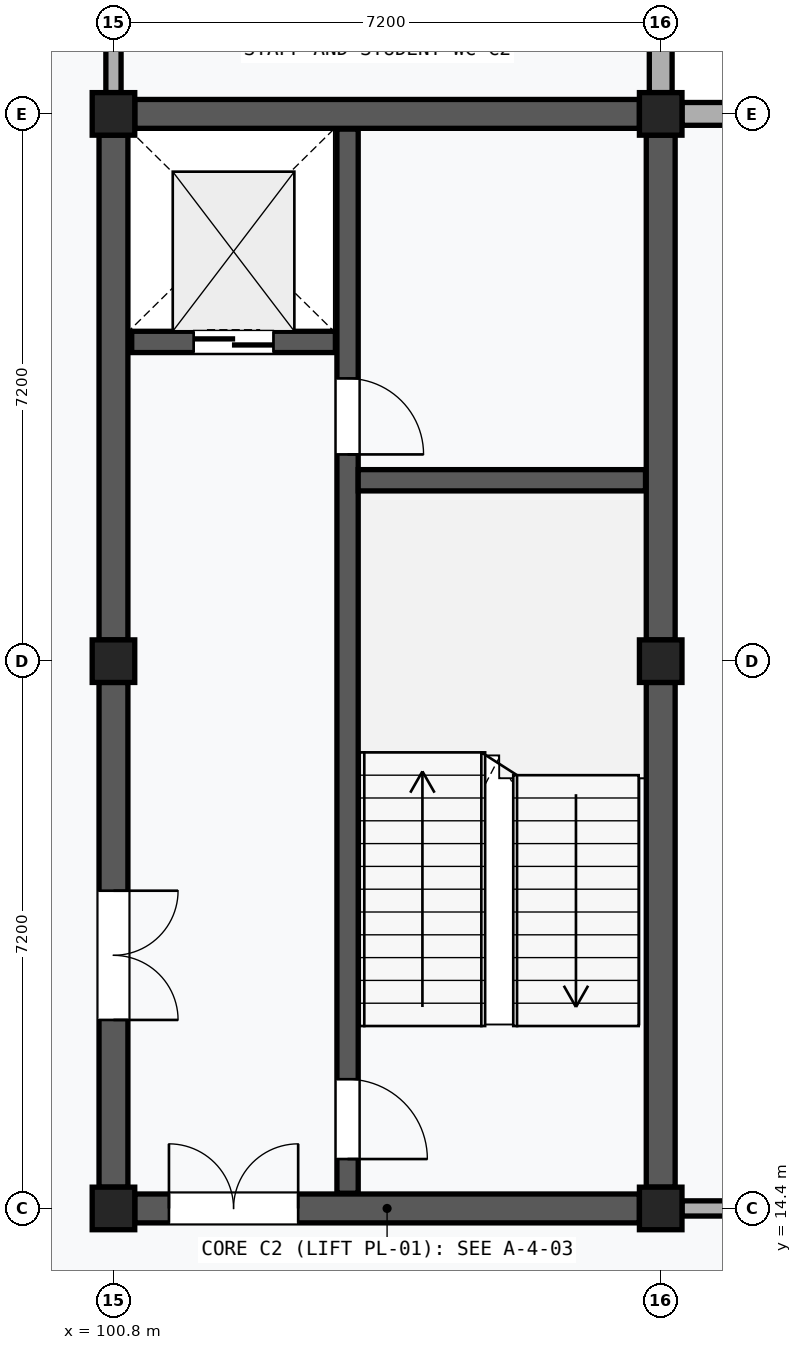
"""IFC4 building model, lengths in metres.
Left out: names, types, materials, properties, quantities, classifications, styles, units other than length and angle.
Written with IfcOpenShell. Run it as: python <this file> out.ifc"""

import sys

from ifc_helpers import new_model, si_unit, direction, frame, frame_2d, origin, origin_2d, place, context, subcontext, project, spatial, rectangle, extrude, element, fill, save


model = new_model("IFC4")
c1 = context("Model", 3, precision=1e-05, world=origin(), true_north=direction((0.0, 1.0)))
c2 = subcontext(c1, "Body", "Model", "MODEL_VIEW")
j1 = project(units=[si_unit("LENGTHUNIT", "METRE"), si_unit("PLANEANGLEUNIT", "RADIAN")], contexts=[c1])
p1 = place(None, origin())
s1 = spatial("IfcSite", under=j1, at=p1, CompositionType="ELEMENT")
p2 = place(p1, origin())
s2 = spatial("IfcBuilding", under=s1, at=p2, CompositionType="ELEMENT")
p3 = place(p2, frame((0.0, 0.0, 34.8)))
s3 = spatial("IfcBuildingStorey", under=s2, at=p3, CompositionType="ELEMENT", Elevation=34.8)
for number, where, z_axis, x_axis in (
    (1, (100.8, 14.4, 0.0), (0.0, 0.0, 1.0), (1.0, 0.0, 0.0)),
    (2, (100.8, 21.6, 0.0), (0.0, 0.0, 1.0), (1.0, 0.0, 0.0)),
    (3, (100.8, 28.8, 0.0), (0.0, 0.0, 1.0), (1.0, 0.0, 0.0)),
    (4, (108.0, 14.4, 0.0), (0.0, 0.0, 1.0), (1.0, 0.0, 0.0)),
    (5, (108.0, 21.6, 0.0), (0.0, 0.0, 1.0), (1.0, 0.0, 0.0)),
    (6, (108.0, 28.8, 0.0), (0.0, 0.0, 1.0), (1.0, 0.0, 0.0)),
):
    element("IfcColumn", number, at=place(p3, frame(where, z_axis=z_axis, x_axis=x_axis)), inside=s3, PredefinedType="COLUMN", context=c2, shape_type="SweptSolid", body=[
        extrude(rectangle(XDim=0.56, YDim=0.56, at=origin_2d()), origin(), (0.0, 0.0, 1.0), 4.0),
    ])
p4 = place(p3, frame((108.0, 29.08, 0.0), z_axis=(0.0, 0.0, 1.0), x_axis=(0.0, 1.0, 0.0)))
e7 = element("IfcWall", 7, at=p4, inside=s3, PredefinedType="SOLIDWALL", context=c2, shape_type="SweptSolid", body=[
    extrude(rectangle(XDim=6.66, YDim=0.3, at=frame_2d((3.33, 0.0))), origin(), (0.0, 0.0, 1.0), 3.19),
])
p5 = place(p3, frame((108.28, 28.8, 0.0), z_axis=(0.0, 0.0, 1.0), x_axis=(1.0, 0.0, 0.0)))
e8 = element("IfcWall", 8, at=p5, inside=s3, PredefinedType="SOLIDWALL", context=c2, shape_type="SweptSolid", body=[
    extrude(rectangle(XDim=6.74, YDim=0.3, at=frame_2d((3.37, 0.0))), origin(), (0.0, 0.0, 1.0), 3.19),
])
p6 = place(p5, frame((2.495, 0.0, 1.2)))
e9 = element("IfcOpeningElement", 9, at=p6, cuts=e8, PredefinedType="OPENING", context=c2, shape_type="SweptSolid", body=[
    extrude(rectangle(XDim=1.75, YDim=1.35, at=frame_2d((0.875, 0.675))), frame((0.0, 0.162, 0.0), z_axis=(0.0, -1.0, 0.0), x_axis=(1.0, 0.0, 0.0)), (0.0, 0.0, 1.0), 0.324),
])
p7 = place(p3, frame((100.8, 14.68, 0.0), z_axis=(0.0, 0.0, 1.0), x_axis=(0.0, 1.0, 0.0)))
e10 = element("IfcWall", 10, at=p7, inside=s3, PredefinedType="SHEAR", context=c2, shape_type="SweptSolid", body=[
    extrude(rectangle(XDim=6.64, YDim=0.38, at=frame_2d((3.32, 0.0))), origin(), (0.0, 0.0, 1.0), 3.03),
])
p8 = place(p7, frame((2.2, 0.0, 0.0)))
e11 = element("IfcOpeningElement", 11, at=p8, cuts=e10, PredefinedType="OPENING", context=c2, shape_type="SweptSolid", body=[
    extrude(rectangle(XDim=1.7, YDim=2.25, at=frame_2d((0.85, 1.125))), frame((0.0, 0.202, 0.0), z_axis=(0.0, -1.0, 0.0), x_axis=(1.0, 0.0, 0.0)), (0.0, 0.0, 1.0), 0.404),
])
for number, where, z_axis, x_axis in (
    (12, (100.8, 21.88, 0.0), (0.0, 0.0, 1.0), (0.0, 1.0, 0.0)),
    (13, (108.0, 14.68, 0.0), (0.0, 0.0, 1.0), (0.0, 1.0, 0.0)),
    (14, (108.0, 21.88, 0.0), (0.0, 0.0, 1.0), (0.0, 1.0, 0.0)),
):
    element("IfcWall", number, at=place(p3, frame(where, z_axis=z_axis, x_axis=x_axis)), inside=s3, PredefinedType="SHEAR", context=c2, shape_type="SweptSolid", body=[
        extrude(rectangle(XDim=6.64, YDim=0.38, at=frame_2d((3.32, 0.0))), origin(), (0.0, 0.0, 1.0), 3.03),
    ])
p9 = place(p3, frame((101.08, 14.4, 0.0), z_axis=(0.0, 0.0, 1.0), x_axis=(1.0, 0.0, 0.0)))
e15 = element("IfcWall", 15, at=p9, inside=s3, PredefinedType="SHEAR", context=c2, shape_type="SweptSolid", body=[
    extrude(rectangle(XDim=6.64, YDim=0.38, at=frame_2d((3.32, 0.0))), origin(), (0.0, 0.0, 1.0), 3.03),
])
p10 = place(p9, frame((0.45, 0.0, 0.0)))
e16 = element("IfcOpeningElement", 16, at=p10, cuts=e15, PredefinedType="OPENING", context=c2, shape_type="SweptSolid", body=[
    extrude(rectangle(XDim=1.7, YDim=2.25, at=frame_2d((0.85, 1.125))), frame((0.0, 0.202, 0.0), z_axis=(0.0, -1.0, 0.0), x_axis=(1.0, 0.0, 0.0)), (0.0, 0.0, 1.0), 0.404),
])
p11 = place(p3, frame((101.08, 28.8, 0.0), z_axis=(0.0, 0.0, 1.0), x_axis=(1.0, 0.0, 0.0)))
e17 = element("IfcWall", 17, at=p11, inside=s3, PredefinedType="SHEAR", context=c2, shape_type="SweptSolid", body=[
    extrude(rectangle(XDim=6.64, YDim=0.38, at=frame_2d((3.32, 0.0))), origin(), (0.0, 0.0, 1.0), 3.03),
])
p12 = place(p3, frame((103.88, 14.6, 0.0), z_axis=(0.0, 0.0, 1.0), x_axis=(0.0, 1.0, 0.0)))
e18 = element("IfcWall", 18, at=p12, inside=s3, PredefinedType="SHEAR", context=c2, shape_type="SweptSolid", body=[
    extrude(rectangle(XDim=14.0, YDim=0.28, at=frame_2d((7.0, 0.0))), origin(), (0.0, 0.0, 1.0), 3.76),
])
p13 = place(p12, frame((0.45, 0.0, 0.0)))
e19 = element("IfcOpeningElement", 19, at=p13, cuts=e18, PredefinedType="OPENING", context=c2, shape_type="SweptSolid", body=[
    extrude(rectangle(XDim=1.05, YDim=2.15, at=frame_2d((0.525, 1.075))), frame((0.0, 0.152, 0.0), z_axis=(0.0, -1.0, 0.0), x_axis=(1.0, 0.0, 0.0)), (0.0, 0.0, 1.0), 0.304),
])
p14 = place(p12, frame((9.72, 0.0, 0.0)))
e20 = element("IfcOpeningElement", 20, at=p14, cuts=e18, PredefinedType="OPENING", context=c2, shape_type="SweptSolid", body=[
    extrude(rectangle(XDim=1.0, YDim=2.15, at=frame_2d((0.5, 1.075))), frame((0.0, 0.152, 0.0), z_axis=(0.0, -1.0, 0.0), x_axis=(1.0, 0.0, 0.0)), (0.0, 0.0, 1.0), 0.304),
])
p15 = place(p3, frame((104.02, 23.98, 0.0), z_axis=(0.0, 0.0, 1.0), x_axis=(1.0, 0.0, 0.0)))
e21 = element("IfcWall", 21, at=p15, inside=s3, PredefinedType="SHEAR", context=c2, shape_type="SweptSolid", body=[
    extrude(rectangle(XDim=3.78, YDim=0.28, at=frame_2d((1.89, 0.0))), origin(), (0.0, 0.0, 1.0), 3.76),
])
p16 = place(p3, frame((101.04, 25.8, 0.0), z_axis=(0.0, 0.0, 1.0), x_axis=(1.0, 0.0, 0.0)))
e22 = element("IfcWall", 22, at=p16, inside=s3, PredefinedType="SHEAR", context=c2, shape_type="SweptSolid", body=[
    extrude(rectangle(XDim=2.68, YDim=0.28, at=frame_2d((1.34, 0.0))), origin(), (0.0, 0.0, 1.0), 3.76),
])
p17 = place(p16, frame((0.815, 0.0, 0.0)))
e23 = element("IfcOpeningElement", 23, at=p17, cuts=e22, PredefinedType="OPENING", context=c2, shape_type="SweptSolid", body=[
    extrude(rectangle(XDim=1.05, YDim=2.2, at=frame_2d((0.525, 1.1))), frame((0.0, 0.152, 0.0), z_axis=(0.0, -1.0, 0.0), x_axis=(1.0, 0.0, 0.0)), (0.0, 0.0, 1.0), 0.304),
])
p18 = place(p3, frame((108.28, 14.4, 0.0), z_axis=(0.0, 0.0, 1.0), x_axis=(1.0, 0.0, 0.0)))
e24 = element("IfcWall", 24, at=p18, inside=s3, PredefinedType="PARTITIONING", context=c2, shape_type="SweptSolid", body=[
    extrude(rectangle(XDim=6.64, YDim=0.2, at=frame_2d((3.32, 0.0))), origin(), (0.0, 0.0, 1.0), 3.03),
])
p19 = place(p18, frame((2.79, 0.0, 0.0)))
e25 = element("IfcOpeningElement", 25, at=p19, cuts=e24, PredefinedType="OPENING", context=c2, shape_type="SweptSolid", body=[
    extrude(rectangle(XDim=1.06, YDim=2.16, at=frame_2d((0.53, 1.08))), frame((0.0, 0.112, 0.0), z_axis=(0.0, -1.0, 0.0), x_axis=(1.0, 0.0, 0.0)), (0.0, 0.0, 1.0), 0.224),
])
p20 = place(p3, frame((100.8, 29.08, 0.0), z_axis=(0.0, 0.0, 1.0), x_axis=(0.0, 1.0, 0.0)))
e26 = element("IfcWall", 26, at=p20, inside=s3, PredefinedType="PARTITIONING", context=c2, shape_type="SweptSolid", body=[
    extrude(rectangle(XDim=6.64, YDim=0.2, at=frame_2d((3.32, 0.0))), origin(), (0.0, 0.0, 1.0), 3.03),
])
p21 = place(p20, frame((2.76, 0.0, 0.0)))
e27 = element("IfcOpeningElement", 27, at=p21, cuts=e26, PredefinedType="OPENING", context=c2, shape_type="SweptSolid", body=[
    extrude(rectangle(XDim=1.12, YDim=2.2, at=frame_2d((0.56, 1.1))), frame((0.0, 0.112, 0.0), z_axis=(0.0, -1.0, 0.0), x_axis=(1.0, 0.0, 0.0)), (0.0, 0.0, 1.0), 0.224),
])
p22 = place(p8, frame((1.7, 0.0, 0.0), z_axis=(0.0, 0.0, 1.0), x_axis=(-1.0, 0.0, 0.0)))
e28 = element("IfcDoor", 28, at=p22, inside=s3, OperationType="DOUBLE_DOOR_SINGLE_SWING", PredefinedType="DOOR", context=c2, shape_type="SweptSolid", body=[
    extrude(rectangle(XDim=1.7, YDim=2.25, at=frame_2d((0.85, 1.125))), frame((0.0, 0.025, 0.0), z_axis=(0.0, -1.0, 0.0), x_axis=(1.0, 0.0, 0.0)), (0.0, 0.0, 1.0), 0.05),
])
fill(e11, e28)
p23 = place(p10, origin())
e29 = element("IfcDoor", 29, at=p23, inside=s3, OperationType="DOUBLE_DOOR_SINGLE_SWING", PredefinedType="DOOR", context=c2, shape_type="SweptSolid", body=[
    extrude(rectangle(XDim=1.7, YDim=2.25, at=frame_2d((0.85, 1.125))), frame((0.0, 0.025, 0.0), z_axis=(0.0, -1.0, 0.0), x_axis=(1.0, 0.0, 0.0)), (0.0, 0.0, 1.0), 0.05),
])
fill(e16, e29)
p24 = place(p13, frame((1.05, 0.0, 0.0), z_axis=(0.0, 0.0, 1.0), x_axis=(-1.0, 0.0, 0.0)))
e30 = element("IfcDoor", 30, at=p24, inside=s3, OperationType="SINGLE_SWING_RIGHT", PredefinedType="DOOR", context=c2, shape_type="SweptSolid", body=[
    extrude(rectangle(XDim=1.05, YDim=2.15, at=frame_2d((0.525, 1.075))), frame((0.0, 0.025, 0.0), z_axis=(0.0, -1.0, 0.0), x_axis=(1.0, 0.0, 0.0)), (0.0, 0.0, 1.0), 0.05),
])
fill(e19, e30)
p25 = place(p14, frame((1.0, 0.0, 0.0), z_axis=(0.0, 0.0, 1.0), x_axis=(-1.0, 0.0, 0.0)))
e31 = element("IfcDoor", 31, at=p25, inside=s3, OperationType="SINGLE_SWING_RIGHT", PredefinedType="DOOR", context=c2, shape_type="SweptSolid", body=[
    extrude(rectangle(XDim=1.0, YDim=2.15, at=frame_2d((0.5, 1.075))), frame((0.0, 0.025, 0.0), z_axis=(0.0, -1.0, 0.0), x_axis=(1.0, 0.0, 0.0)), (0.0, 0.0, 1.0), 0.05),
])
fill(e20, e31)
p26 = place(p17, frame((1.05, 0.0, 0.0), z_axis=(0.0, 0.0, 1.0), x_axis=(-1.0, 0.0, 0.0)))
e32 = element("IfcDoor", 32, at=p26, inside=s3, OperationType="DOUBLE_DOOR_SLIDING", PredefinedType="DOOR", context=c2, shape_type="SweptSolid", body=[
    extrude(rectangle(XDim=1.05, YDim=2.2, at=frame_2d((0.525, 1.1))), frame((0.0, 0.025, 0.0), z_axis=(0.0, -1.0, 0.0), x_axis=(1.0, 0.0, 0.0)), (0.0, 0.0, 1.0), 0.05),
])
fill(e23, e32)
save(model, sys.argv[1])
